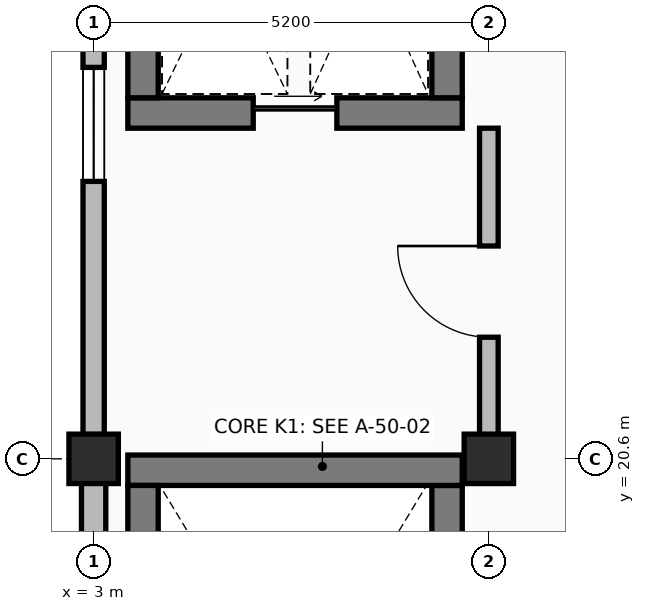
"""IFC4 building model, lengths in metres.
Left out: names, types, materials, properties, quantities, classifications, styles, units other than length and angle.
Written with IfcOpenShell. Run it as: python <this file> out.ifc"""

import sys

from ifc_helpers import new_model, si_unit, direction, frame, frame_2d, origin, origin_2d, place, context, subcontext, project, spatial, rectangle, extrude, element, fill, save


model = new_model("IFC4")
c1 = context("Model", 3, precision=1e-05, world=origin(), true_north=direction((0.0, 1.0)))
c2 = subcontext(c1, "Body", "Model", "MODEL_VIEW")
j1 = project(units=[si_unit("LENGTHUNIT", "METRE"), si_unit("PLANEANGLEUNIT", "RADIAN")], contexts=[c1])
p1 = place(None, origin())
s1 = spatial("IfcSite", under=j1, at=p1, CompositionType="ELEMENT")
p2 = place(p1, origin())
s2 = spatial("IfcBuilding", under=s1, at=p2, CompositionType="ELEMENT")
p3 = place(p2, frame((0.0, 0.0, 4.8)))
s3 = spatial("IfcBuildingStorey", under=s2, at=p3, CompositionType="ELEMENT", Elevation=4.8)
for number, where, z_axis, x_axis in (
    (1, (3.0, 20.6, 0.0), (0.0, 0.0, 1.0), (1.0, 0.0, 0.0)),
    (2, (8.2, 20.6, 0.0), (0.0, 0.0, 1.0), (1.0, 0.0, 0.0)),
):
    element("IfcColumn", number, at=place(p3, frame(where, z_axis=z_axis, x_axis=x_axis)), inside=s3, PredefinedType="COLUMN", context=c2, shape_type="SweptSolid", body=[
        extrude(rectangle(XDim=0.65, YDim=0.65, at=origin_2d()), origin(), (0.0, 0.0, 1.0), 4.8),
    ])
p4 = place(p3, frame((3.0, 20.28, 0.0), z_axis=(0.0, 0.0, 1.0), x_axis=(0.0, -1.0, 0.0)))
e3 = element("IfcWall", 3, at=p4, inside=s3, PredefinedType="SOLIDWALL", context=c2, shape_type="SweptSolid", body=[
    extrude(rectangle(XDim=3.86, YDim=0.32, at=frame_2d((1.93, 0.0))), origin(), (0.0, 0.0, 1.0), 3.71),
])
p5 = place(p4, frame((1.33, 0.0, 0.9)))
e4 = element("IfcOpeningElement", 4, at=p5, cuts=e3, PredefinedType="OPENING", context=c2, shape_type="SweptSolid", body=[
    extrude(rectangle(XDim=1.2, YDim=1.5, at=frame_2d((0.6, 0.75))), frame((0.0, 0.17, 0.0), z_axis=(0.0, -1.0, 0.0), x_axis=(1.0, 0.0, 0.0)), (0.0, 0.0, 1.0), 0.34),
])
p6 = place(p3, frame((3.0, 29.08, 0.0), z_axis=(0.0, 0.0, 1.0), x_axis=(0.0, -1.0, 0.0)))
e5 = element("IfcWall", 5, at=p6, inside=s3, PredefinedType="SOLIDWALL", context=c2, shape_type="SweptSolid", body=[
    extrude(rectangle(XDim=8.16, YDim=0.28, at=frame_2d((4.08, 0.0))), origin(), (0.0, 0.0, 1.0), 3.71),
])
p7 = place(p6, frame((3.33, 0.0, 0.9)))
e6 = element("IfcOpeningElement", 6, at=p7, cuts=e5, PredefinedType="OPENING", context=c2, shape_type="SweptSolid", body=[
    extrude(rectangle(XDim=1.5, YDim=1.5, at=frame_2d((0.75, 0.75))), frame((0.0, 0.15, 0.0), z_axis=(0.0, -1.0, 0.0), x_axis=(1.0, 0.0, 0.0)), (0.0, 0.0, 1.0), 0.3),
])
p8 = place(p3, frame((7.65, 12.6, 0.0), z_axis=(0.0, 0.0, 1.0), x_axis=(0.0, 1.0, 0.0)))
e7 = element("IfcWall", 7, at=p8, inside=s3, PredefinedType="SHEAR", context=c2, shape_type="SweptSolid", body=[
    extrude(rectangle(XDim=7.65, YDim=0.4, at=frame_2d((3.825, 0.0))), origin(), (0.0, 0.0, 1.0), 4.49),
])
p9 = place(p8, frame((0.4, 0.0, 0.0)))
e8 = element("IfcOpeningElement", 8, at=p9, cuts=e7, PredefinedType="OPENING", context=c2, shape_type="SweptSolid", body=[
    extrude(rectangle(XDim=1.1, YDim=2.2, at=frame_2d((0.55, 1.1))), frame((0.0, 0.21, 0.0), z_axis=(0.0, -1.0, 0.0), x_axis=(1.0, 0.0, 0.0)), (0.0, 0.0, 1.0), 0.42),
])
p10 = place(p3, frame((7.85, 20.45, 0.0), z_axis=(0.0, 0.0, 1.0), x_axis=(-1.0, 0.0, 0.0)))
e9 = element("IfcWall", 9, at=p10, inside=s3, PredefinedType="SHEAR", context=c2, shape_type="SweptSolid", body=[
    extrude(rectangle(XDim=4.4, YDim=0.4, at=frame_2d((2.2, 0.0))), origin(), (0.0, 0.0, 1.0), 4.49),
])
p11 = place(p3, frame((3.65, 20.25, 0.0), z_axis=(0.0, 0.0, 1.0), x_axis=(0.0, -1.0, 0.0)))
e10 = element("IfcWall", 10, at=p11, inside=s3, PredefinedType="SHEAR", context=c2, shape_type="SweptSolid", body=[
    extrude(rectangle(XDim=7.65, YDim=0.4, at=frame_2d((3.825, 0.0))), origin(), (0.0, 0.0, 1.0), 4.49),
])
p12 = place(p3, frame((3.45, 25.15, 0.0), z_axis=(0.0, 0.0, 1.0), x_axis=(1.0, 0.0, 0.0)))
e11 = element("IfcWall", 11, at=p12, inside=s3, PredefinedType="SHEAR", context=c2, shape_type="SweptSolid", body=[
    extrude(rectangle(XDim=4.4, YDim=0.4, at=frame_2d((2.2, 0.0))), origin(), (0.0, 0.0, 1.0), 4.49),
])
p13 = place(p12, frame((1.65, 0.0, 0.0)))
e12 = element("IfcOpeningElement", 12, at=p13, cuts=e11, PredefinedType="OPENING", context=c2, shape_type="SweptSolid", body=[
    extrude(rectangle(XDim=1.1, YDim=2.2, at=frame_2d((0.55, 1.1))), frame((0.0, 0.21, 0.0), z_axis=(0.0, -1.0, 0.0), x_axis=(1.0, 0.0, 0.0)), (0.0, 0.0, 1.0), 0.42),
])
for number, where, z_axis, x_axis in (
    (13, (7.65, 25.35, 0.0), (0.0, 0.0, 1.0), (0.0, 1.0, 0.0)),
    (14, (3.65, 28.85, 0.0), (0.0, 0.0, 1.0), (0.0, -1.0, 0.0)),
):
    element("IfcWall", number, at=place(p3, frame(where, z_axis=z_axis, x_axis=x_axis)), inside=s3, PredefinedType="SHEAR", context=c2, shape_type="SweptSolid", body=[
        extrude(rectangle(XDim=3.5, YDim=0.4, at=frame_2d((1.75, 0.0))), origin(), (0.0, 0.0, 1.0), 4.49),
    ])
p14 = place(p3, frame((8.2, 20.65, 0.0), z_axis=(0.0, 0.0, 1.0), x_axis=(0.0, 1.0, 0.0)))
e15 = element("IfcWall", 15, at=p14, inside=s3, PredefinedType="PARTITIONING", context=c2, shape_type="SweptSolid", body=[
    extrude(rectangle(XDim=4.3, YDim=0.245, at=frame_2d((2.15, 0.0))), origin(), (0.0, 0.0, 1.0), 3.6),
])
p15 = place(p14, frame((1.55, 0.0, 0.0)))
e16 = element("IfcOpeningElement", 16, at=p15, cuts=e15, PredefinedType="OPENING", context=c2, shape_type="SweptSolid", body=[
    extrude(rectangle(XDim=1.2, YDim=2.2, at=frame_2d((0.6, 1.1))), frame((0.0, 0.133, 0.0), z_axis=(0.0, -1.0, 0.0), x_axis=(1.0, 0.0, 0.0)), (0.0, 0.0, 1.0), 0.265),
])
p16 = place(p7, origin())
e17 = element("IfcWindow", 17, at=p16, inside=s3, PartitioningType="SINGLE_PANEL", PredefinedType="WINDOW", context=c2, shape_type="SweptSolid", body=[
    extrude(rectangle(XDim=1.5, YDim=1.5, at=frame_2d((0.75, 0.75))), frame((0.0, 0.03, 0.0), z_axis=(0.0, -1.0, 0.0), x_axis=(1.0, 0.0, 0.0)), (0.0, 0.0, 1.0), 0.06),
])
fill(e6, e17)
p17 = place(p13, origin())
e18 = element("IfcDoor", 18, at=p17, inside=s3, OperationType="SLIDING_TO_RIGHT", PredefinedType="DOOR", context=c2, shape_type="SweptSolid", body=[
    extrude(rectangle(XDim=1.1, YDim=2.2, at=frame_2d((0.55, 1.1))), frame((0.0, 0.025, 0.0), z_axis=(0.0, -1.0, 0.0), x_axis=(1.0, 0.0, 0.0)), (0.0, 0.0, 1.0), 0.05),
])
fill(e12, e18)
p18 = place(p15, origin())
e19 = element("IfcDoor", 19, at=p18, inside=s3, OperationType="SINGLE_SWING_RIGHT", PredefinedType="DOOR", context=c2, shape_type="SweptSolid", body=[
    extrude(rectangle(XDim=1.2, YDim=2.2, at=frame_2d((0.6, 1.1))), frame((0.0, 0.025, 0.0), z_axis=(0.0, -1.0, 0.0), x_axis=(1.0, 0.0, 0.0)), (0.0, 0.0, 1.0), 0.05),
])
fill(e16, e19)
save(model, sys.argv[1])
